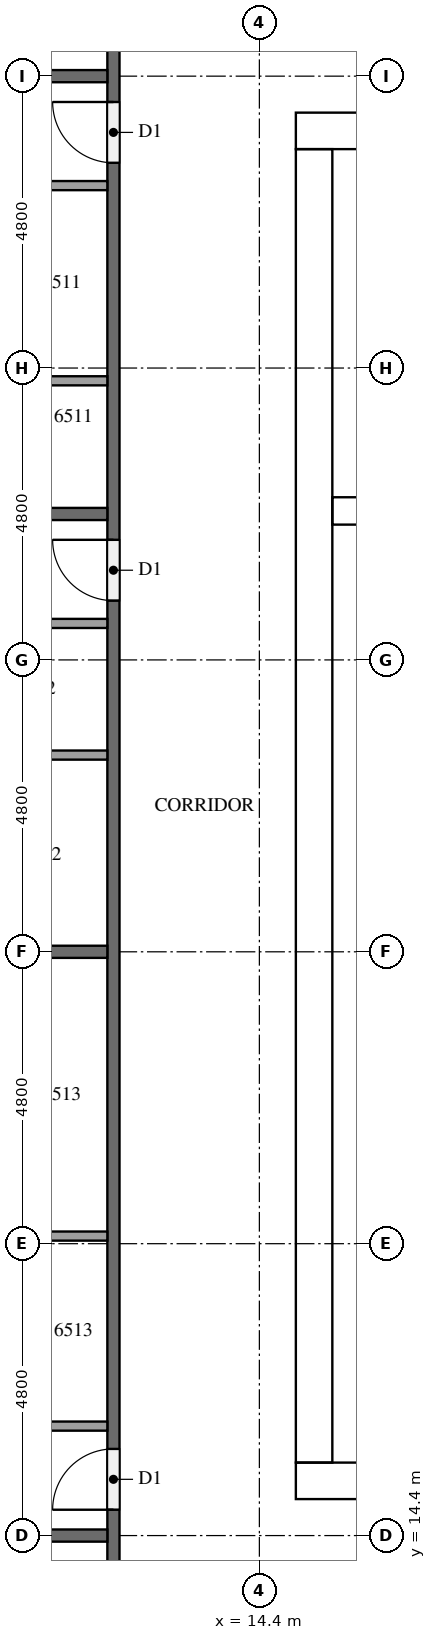
"""IFC4 building model, lengths in metres.
Left out: names, types, materials, properties, quantities, classifications, styles, units other than length and angle.
Written with IfcOpenShell. Run it as: python <this file> out.ifc"""

import sys

from ifc_helpers import new_model, si_unit, direction, frame, frame_2d, origin, place, context, subcontext, project, spatial, rectangle, extrude, element, fill, save


model = new_model("IFC4")
c1 = context("Model", 3, precision=1e-05, world=origin(), true_north=direction((0.0, 1.0)))
c2 = subcontext(c1, "Body", "Model", "MODEL_VIEW")
j1 = project(units=[si_unit("LENGTHUNIT", "METRE"), si_unit("PLANEANGLEUNIT", "RADIAN")], contexts=[c1])
p1 = place(None, origin())
s1 = spatial("IfcSite", under=j1, at=p1, CompositionType="ELEMENT")
p2 = place(p1, origin())
s2 = spatial("IfcBuilding", under=s1, at=p2, CompositionType="ELEMENT")
p3 = place(p2, frame((0.0, 0.0, 249.2)))
s3 = spatial("IfcBuildingStorey", under=s2, at=p3, CompositionType="ELEMENT", Elevation=249.2)
p4 = place(p3, frame((15.0, 15.3, 0.0), z_axis=(0.0, 0.0, 1.0), x_axis=(1.0, 0.0, 0.0)))
e1 = element("IfcWall", 1, at=p4, inside=s3, PredefinedType="SHEAR", context=c2, shape_type="SweptSolid", body=[
    extrude(rectangle(XDim=32.4, YDim=0.6, at=frame_2d((16.2, 0.0))), origin(), (0.0, 0.0, 1.0), 3.2),
])
p5 = place(p4, frame((15.3, 0.0, 0.0)))
e2 = element("IfcOpeningElement", 2, at=p5, cuts=e1, PredefinedType="OPENING", context=c2, shape_type="SweptSolid", body=[
    extrude(rectangle(XDim=1.8, YDim=2.1, at=frame_2d((0.9, 1.05))), frame((0.0, 0.31, 0.0), z_axis=(0.0, -1.0, 0.0), x_axis=(1.0, 0.0, 0.0)), (0.0, 0.0, 1.0), 0.62),
])
p6 = place(p3, frame((15.0, 37.5, 0.0), z_axis=(0.0, 0.0, 1.0), x_axis=(1.0, 0.0, 0.0)))
e3 = element("IfcWall", 3, at=p6, inside=s3, PredefinedType="SHEAR", context=c2, shape_type="SweptSolid", body=[
    extrude(rectangle(XDim=32.4, YDim=0.6, at=frame_2d((16.2, 0.0))), origin(), (0.0, 0.0, 1.0), 3.2),
])
p7 = place(p6, frame((15.3, 0.0, 0.0)))
e4 = element("IfcOpeningElement", 4, at=p7, cuts=e3, PredefinedType="OPENING", context=c2, shape_type="SweptSolid", body=[
    extrude(rectangle(XDim=1.8, YDim=2.1, at=frame_2d((0.9, 1.05))), frame((0.0, 0.31, 0.0), z_axis=(0.0, -1.0, 0.0), x_axis=(1.0, 0.0, 0.0)), (0.0, 0.0, 1.0), 0.62),
])
p8 = place(p6, frame((1.25, 0.0, 0.0)))
e5 = element("IfcOpeningElement", 5, at=p8, cuts=e3, PredefinedType="OPENING", context=c2, shape_type="SweptSolid", body=[
    extrude(rectangle(XDim=1.0, YDim=2.1, at=frame_2d((0.5, 1.05))), frame((0.0, 0.31, 0.0), z_axis=(0.0, -1.0, 0.0), x_axis=(1.0, 0.0, 0.0)), (0.0, 0.0, 1.0), 0.62),
])
p9 = place(p6, frame((4.988, 0.0, 0.0)))
e6 = element("IfcOpeningElement", 6, at=p9, cuts=e3, PredefinedType="OPENING", context=c2, shape_type="SweptSolid", body=[
    extrude(rectangle(XDim=1.0, YDim=2.1, at=frame_2d((0.5, 1.05))), frame((0.0, 0.31, 0.0), z_axis=(0.0, -1.0, 0.0), x_axis=(1.0, 0.0, 0.0)), (0.0, 0.0, 1.0), 0.62),
])
p10 = place(p3, frame((15.3, 15.6, 0.0), z_axis=(0.0, 0.0, 1.0), x_axis=(0.0, 1.0, 0.0)))
e7 = element("IfcWall", 7, at=p10, inside=s3, PredefinedType="SHEAR", context=c2, shape_type="SweptSolid", body=[
    extrude(rectangle(XDim=21.6, YDim=0.6, at=frame_2d((10.8, 0.0))), origin(), (0.0, 0.0, 1.0), 3.2),
])
p11 = place(p10, frame((5.16, 0.0, 0.0)))
e8 = element("IfcOpeningElement", 8, at=p11, cuts=e7, PredefinedType="OPENING", context=c2, shape_type="SweptSolid", body=[
    extrude(rectangle(XDim=1.2, YDim=2.1, at=frame_2d((0.6, 1.05))), frame((0.0, 0.31, 0.0), z_axis=(0.0, -1.0, 0.0), x_axis=(1.0, 0.0, 0.0)), (0.0, 0.0, 1.0), 0.62),
])
p12 = place(p3, frame((15.6, 31.25, 0.0), z_axis=(0.0, 0.0, 1.0), x_axis=(1.0, 0.0, 0.0)))
e9 = element("IfcWall", 9, at=p12, inside=s3, PredefinedType="SHEAR", context=c2, shape_type="SweptSolid", body=[
    extrude(rectangle(XDim=7.275, YDim=0.45, at=frame_2d((3.637, 0.0))), origin(), (0.0, 0.0, 1.0), 3.2),
])
p13 = place(p3, frame((12.0, 12.1, 0.0), z_axis=(0.0, 0.0, 1.0), x_axis=(0.0, 1.0, 0.0)))
e10 = element("IfcWall", 10, at=p13, inside=s3, PredefinedType="PARTITIONING", context=c2, shape_type="SweptSolid", body=[
    extrude(rectangle(XDim=28.6, YDim=0.2, at=frame_2d((14.3, 0.0))), origin(), (0.0, 0.0, 1.0), 3.2),
])
p14 = place(p13, frame((26.725, 0.0, 0.0)))
e11 = element("IfcOpeningElement", 11, at=p14, cuts=e10, PredefinedType="OPENING", context=c2, shape_type="SweptSolid", body=[
    extrude(rectangle(XDim=1.0, YDim=2.1, at=frame_2d((0.5, 1.05))), frame((0.0, 0.11, 0.0), z_axis=(0.0, -1.0, 0.0), x_axis=(1.0, 0.0, 0.0)), (0.0, 0.0, 1.0), 0.22),
])
p15 = place(p13, frame((24.875, 0.0, 0.0)))
e12 = element("IfcOpeningElement", 12, at=p15, cuts=e10, PredefinedType="OPENING", context=c2, shape_type="SweptSolid", body=[
    extrude(rectangle(XDim=1.0, YDim=2.1, at=frame_2d((0.5, 1.05))), frame((0.0, 0.11, 0.0), z_axis=(0.0, -1.0, 0.0), x_axis=(1.0, 0.0, 0.0)), (0.0, 0.0, 1.0), 0.22),
])
p16 = place(p13, frame((17.675, 0.0, 0.0)))
e13 = element("IfcOpeningElement", 13, at=p16, cuts=e10, PredefinedType="OPENING", context=c2, shape_type="SweptSolid", body=[
    extrude(rectangle(XDim=1.0, YDim=2.1, at=frame_2d((0.5, 1.05))), frame((0.0, 0.11, 0.0), z_axis=(0.0, -1.0, 0.0), x_axis=(1.0, 0.0, 0.0)), (0.0, 0.0, 1.0), 0.22),
])
p17 = place(p13, frame((2.725, 0.0, 0.0)))
e14 = element("IfcOpeningElement", 14, at=p17, cuts=e10, PredefinedType="OPENING", context=c2, shape_type="SweptSolid", body=[
    extrude(rectangle(XDim=1.0, YDim=2.1, at=frame_2d((0.5, 1.05))), frame((0.0, 0.11, 0.0), z_axis=(0.0, -1.0, 0.0), x_axis=(1.0, 0.0, 0.0)), (0.0, 0.0, 1.0), 0.22),
])
p18 = place(p13, frame((0.875, 0.0, 0.0)))
e15 = element("IfcOpeningElement", 15, at=p18, cuts=e10, PredefinedType="OPENING", context=c2, shape_type="SweptSolid", body=[
    extrude(rectangle(XDim=1.0, YDim=2.1, at=frame_2d((0.5, 1.05))), frame((0.0, 0.11, 0.0), z_axis=(0.0, -1.0, 0.0), x_axis=(1.0, 0.0, 0.0)), (0.0, 0.0, 1.0), 0.22),
])
p19 = place(p3, frame((0.275, 38.4, 0.0), z_axis=(0.0, 0.0, 1.0), x_axis=(1.0, 0.0, 0.0)))
e16 = element("IfcWall", 16, at=p19, inside=s3, PredefinedType="PARTITIONING", context=c2, shape_type="SweptSolid", body=[
    extrude(rectangle(XDim=11.625, YDim=0.2, at=frame_2d((5.812, 0.0))), origin(), (0.0, 0.0, 1.0), 3.2),
])
for number, where, z_axis, x_axis in (
    (17, (0.1, 31.2, 0.0), (0.0, 0.0, 1.0), (1.0, 0.0, 0.0)),
    (18, (0.1, 24.0, 0.0), (0.0, 0.0, 1.0), (1.0, 0.0, 0.0)),
    (19, (0.1, 14.4, 0.0), (0.0, 0.0, 1.0), (1.0, 0.0, 0.0)),
):
    element("IfcWall", number, at=place(p3, frame(where, z_axis=z_axis, x_axis=x_axis)), inside=s3, PredefinedType="PARTITIONING", context=c2, shape_type="SweptSolid", body=[
        extrude(rectangle(XDim=11.8, YDim=0.2, at=frame_2d((5.9, 0.0))), origin(), (0.0, 0.0, 1.0), 3.2),
    ])
p20 = place(p3, frame((11.9, 33.39, 0.0), z_axis=(0.0, 0.0, 1.0), x_axis=(-1.0, 0.0, 0.0)))
e20 = element("IfcWall", 20, at=p20, inside=s3, PredefinedType="PARTITIONING", context=c2, shape_type="SweptSolid", body=[
    extrude(rectangle(XDim=2.975, YDim=0.15, at=frame_2d((1.487, 0.0))), origin(), (0.0, 0.0, 1.0), 3.2),
])
p21 = place(p3, frame((11.9, 36.6, 0.0), z_axis=(0.0, 0.0, 1.0), x_axis=(-1.0, 0.0, 0.0)))
e21 = element("IfcWall", 21, at=p21, inside=s3, PredefinedType="PARTITIONING", context=c2, shape_type="SweptSolid", body=[
    extrude(rectangle(XDim=3.125, YDim=0.15, at=frame_2d((1.562, 0.0))), origin(), (0.0, 0.0, 1.0), 3.2),
])
p22 = place(p3, frame((11.9, 27.235, 0.0), z_axis=(0.0, 0.0, 1.0), x_axis=(-1.0, 0.0, 0.0)))
e22 = element("IfcWall", 22, at=p22, inside=s3, PredefinedType="PARTITIONING", context=c2, shape_type="SweptSolid", body=[
    extrude(rectangle(XDim=4.175, YDim=0.15, at=frame_2d((2.087, 0.0))), origin(), (0.0, 0.0, 1.0), 3.2),
])
p23 = place(p3, frame((11.9, 29.4, 0.0), z_axis=(0.0, 0.0, 1.0), x_axis=(-1.0, 0.0, 0.0)))
e23 = element("IfcWall", 23, at=p23, inside=s3, PredefinedType="PARTITIONING", context=c2, shape_type="SweptSolid", body=[
    extrude(rectangle(XDim=4.325, YDim=0.15, at=frame_2d((2.163, 0.0))), origin(), (0.0, 0.0, 1.0), 3.2),
])
p24 = place(p3, frame((11.9, 19.325, 0.0), z_axis=(0.0, 0.0, 1.0), x_axis=(-1.0, 0.0, 0.0)))
e24 = element("IfcWall", 24, at=p24, inside=s3, PredefinedType="PARTITIONING", context=c2, shape_type="SweptSolid", body=[
    extrude(rectangle(XDim=2.975, YDim=0.15, at=frame_2d((1.487, 0.0))), origin(), (0.0, 0.0, 1.0), 3.2),
])
p25 = place(p3, frame((11.9, 16.2, 0.0), z_axis=(0.0, 0.0, 1.0), x_axis=(-1.0, 0.0, 0.0)))
e25 = element("IfcWall", 25, at=p25, inside=s3, PredefinedType="PARTITIONING", context=c2, shape_type="SweptSolid", body=[
    extrude(rectangle(XDim=3.125, YDim=0.15, at=frame_2d((1.562, 0.0))), origin(), (0.0, 0.0, 1.0), 3.2),
])
p26 = place(p11, frame((1.2, 0.0, 0.0), z_axis=(0.0, 0.0, 1.0), x_axis=(-1.0, 0.0, 0.0)))
e26 = element("IfcDoor", 26, at=p26, inside=s3, OperationType="SINGLE_SWING_RIGHT", PredefinedType="DOOR", context=c2, shape_type="SweptSolid", body=[
    extrude(rectangle(XDim=1.2, YDim=2.1, at=frame_2d((0.6, 1.05))), frame((0.0, 0.025, 0.0), z_axis=(0.0, -1.0, 0.0), x_axis=(1.0, 0.0, 0.0)), (0.0, 0.0, 1.0), 0.05),
])
fill(e8, e26)
p27 = place(p15, origin())
e27 = element("IfcDoor", 27, at=p27, inside=s3, OperationType="SINGLE_SWING_RIGHT", PredefinedType="DOOR", context=c2, shape_type="SweptSolid", body=[
    extrude(rectangle(XDim=1.0, YDim=2.1, at=frame_2d((0.5, 1.05))), frame((0.0, 0.025, 0.0), z_axis=(0.0, -1.0, 0.0), x_axis=(1.0, 0.0, 0.0)), (0.0, 0.0, 1.0), 0.05),
])
fill(e12, e27)
p28 = place(p16, origin())
e28 = element("IfcDoor", 28, at=p28, inside=s3, OperationType="SINGLE_SWING_RIGHT", PredefinedType="DOOR", context=c2, shape_type="SweptSolid", body=[
    extrude(rectangle(XDim=1.0, YDim=2.1, at=frame_2d((0.5, 1.05))), frame((0.0, 0.025, 0.0), z_axis=(0.0, -1.0, 0.0), x_axis=(1.0, 0.0, 0.0)), (0.0, 0.0, 1.0), 0.05),
])
fill(e13, e28)
p29 = place(p17, origin())
e29 = element("IfcDoor", 29, at=p29, inside=s3, OperationType="SINGLE_SWING_LEFT", PredefinedType="DOOR", context=c2, shape_type="SweptSolid", body=[
    extrude(rectangle(XDim=1.0, YDim=2.1, at=frame_2d((0.5, 1.05))), frame((0.0, 0.025, 0.0), z_axis=(0.0, -1.0, 0.0), x_axis=(1.0, 0.0, 0.0)), (0.0, 0.0, 1.0), 0.05),
])
fill(e14, e29)
save(model, sys.argv[1])
